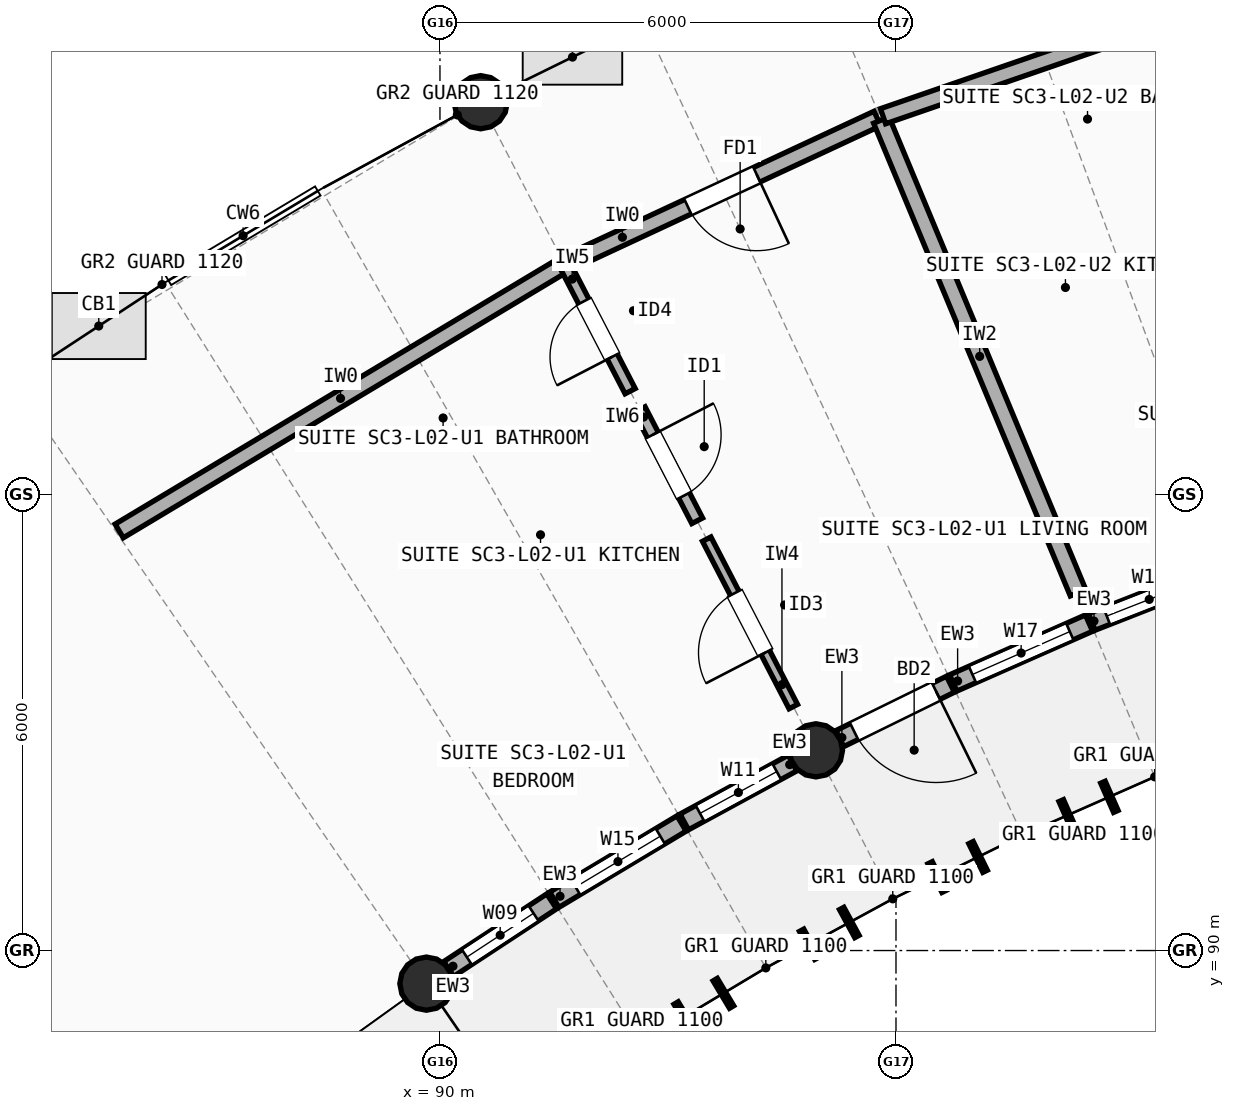
"""IFC4 building model, lengths in metres.
Left out: names, types, materials, properties, quantities, classifications, styles, units other than length and angle.
Written with IfcOpenShell. Run it as: python <this file> out.ifc"""

import sys

from ifc_helpers import new_model, si_unit, direction, frame, frame_2d, origin, origin_2d, place, context, subcontext, project, spatial, rectangle, circle, extrude, element, fill, save


model = new_model("IFC4")
c1 = context("Model", 3, precision=1e-05, world=origin(), true_north=direction((0.0, 1.0)))
c2 = subcontext(c1, "Body", "Model", "MODEL_VIEW")
j1 = project(units=[si_unit("LENGTHUNIT", "METRE"), si_unit("PLANEANGLEUNIT", "RADIAN")], contexts=[c1])
p1 = place(None, origin())
s1 = spatial("IfcSite", under=j1, at=p1, CompositionType="ELEMENT")
p2 = place(p1, origin())
s2 = spatial("IfcBuilding", under=s1, at=p2, CompositionType="ELEMENT")
p3 = place(p2, frame((0.0, 0.0, 7.7)))
s3 = spatial("IfcBuildingStorey", under=s2, at=p3, CompositionType="ELEMENT", Elevation=7.7)
for number, where, z_axis, x_axis in (
    (1, (89.822, 89.564, 0.0), (0.0, 0.0, 1.0), (1.0, 0.0, 0.0)),
    (2, (94.947, 92.634, 0.0), (0.0, 0.0, 1.0), (1.0, 0.0, 0.0)),
    (3, (90.536, 101.161, 0.0), (0.0, 0.0, 1.0), (1.0, 0.0, 0.0)),
):
    element("IfcColumn", number, at=place(p3, frame(where, z_axis=z_axis, x_axis=x_axis)), inside=s3, PredefinedType="COLUMN", context=c2, shape_type="SweptSolid", body=[
        extrude(circle(Radius=0.35, at=origin_2d()), origin(), (0.0, 0.0, 1.0), 2.948),
    ])
p4 = place(p3, frame((90.114, 89.757, 0.0), z_axis=(0.0, 0.0, 1.0), x_axis=(0.835873156341, 0.548922641644, 0.0)))
e4 = element("IfcWall", 4, at=p4, inside=s3, PredefinedType="STANDARD", context=c2, shape_type="SweptSolid", body=[
    extrude(rectangle(XDim=1.623, YDim=0.235, at=frame_2d((0.811, 0.0))), origin(), (0.0, 0.0, 1.0), 2.684),
])
p5 = place(p4, frame((0.286, 0.0, 0.85)))
e5 = element("IfcOpeningElement", 5, at=p5, cuts=e4, PredefinedType="OPENING", context=c2, shape_type="SweptSolid", body=[
    extrude(rectangle(XDim=1.05, YDim=1.35, at=frame_2d((0.525, 0.675))), frame((0.0, 0.127, 0.0), z_axis=(0.0, -1.0, 0.0), x_axis=(1.0, 0.0, 0.0)), (0.0, 0.0, 1.0), 0.255),
])
p6 = place(p3, frame((91.504, 90.668, 0.0), z_axis=(0.0, 0.0, 1.0), x_axis=(0.85787888411, 0.51385194385, 0.0)))
e6 = element("IfcWall", 6, at=p6, inside=s3, PredefinedType="STANDARD", context=c2, shape_type="SweptSolid", body=[
    extrude(rectangle(XDim=1.952, YDim=0.235, at=frame_2d((0.976, 0.0))), origin(), (0.0, 0.0, 1.0), 2.684),
])
p7 = place(p6, frame((0.326, 0.0, 0.85)))
e7 = element("IfcOpeningElement", 7, at=p7, cuts=e6, PredefinedType="OPENING", context=c2, shape_type="SweptSolid", body=[
    extrude(rectangle(XDim=1.3, YDim=1.45, at=frame_2d((0.65, 0.725))), frame((0.0, 0.127, 0.0), z_axis=(0.0, -1.0, 0.0), x_axis=(1.0, 0.0, 0.0)), (0.0, 0.0, 1.0), 0.255),
])
p8 = place(p3, frame((93.214, 91.692, 0.0), z_axis=(0.0, 0.0, 1.0), x_axis=(0.878452871629, 0.477828999044, 0.0)))
e8 = element("IfcWall", 8, at=p8, inside=s3, PredefinedType="STANDARD", context=c2, shape_type="SweptSolid", body=[
    extrude(rectangle(XDim=1.622, YDim=0.235, at=frame_2d((0.811, 0.0))), origin(), (0.0, 0.0, 1.0), 2.684),
])
p9 = place(p8, frame((0.236, 0.0, 0.85)))
e9 = element("IfcOpeningElement", 9, at=p9, cuts=e8, PredefinedType="OPENING", context=c2, shape_type="SweptSolid", body=[
    extrude(rectangle(XDim=1.15, YDim=1.45, at=frame_2d((0.575, 0.725))), frame((0.0, 0.127, 0.0), z_axis=(0.0, -1.0, 0.0), x_axis=(1.0, 0.0, 0.0)), (0.0, 0.0, 1.0), 0.255),
])
p10 = place(p3, frame((95.261, 92.788, 0.0), z_axis=(0.0, 0.0, 1.0), x_axis=(0.897535518759, 0.440942164649, 0.0)))
e10 = element("IfcWall", 10, at=p10, inside=s3, PredefinedType="STANDARD", context=c2, shape_type="SweptSolid", body=[
    extrude(rectangle(XDim=1.622, YDim=0.235, at=frame_2d((0.811, 0.0))), origin(), (0.0, 0.0, 1.0), 2.684),
])
p11 = place(p10, frame((0.211, 0.0, 0.0)))
e11 = element("IfcOpeningElement", 11, at=p11, cuts=e10, PredefinedType="OPENING", context=c2, shape_type="SweptSolid", body=[
    extrude(rectangle(XDim=1.2, YDim=2.15, at=frame_2d((0.6, 1.075))), frame((0.0, 0.127, 0.0), z_axis=(0.0, -1.0, 0.0), x_axis=(1.0, 0.0, 0.0)), (0.0, 0.0, 1.0), 0.255),
])
p12 = place(p3, frame((96.753, 93.521, 0.0), z_axis=(0.0, 0.0, 1.0), x_axis=(0.915126852478, 0.403166025197, 0.0)))
e12 = element("IfcWall", 12, at=p12, inside=s3, PredefinedType="STANDARD", context=c2, shape_type="SweptSolid", body=[
    extrude(rectangle(XDim=1.952, YDim=0.235, at=frame_2d((0.976, 0.0))), origin(), (0.0, 0.0, 1.0), 2.684),
])
p13 = place(p12, frame((0.276, 0.0, 0.85)))
e13 = element("IfcOpeningElement", 13, at=p13, cuts=e12, PredefinedType="OPENING", context=c2, shape_type="SweptSolid", body=[
    extrude(rectangle(XDim=1.4, YDim=1.5, at=frame_2d((0.7, 0.75))), frame((0.0, 0.127, 0.0), z_axis=(0.0, -1.0, 0.0), x_axis=(1.0, 0.0, 0.0)), (0.0, 0.0, 1.0), 0.255),
])
p14 = place(p3, frame((98.577, 94.323, 0.0), z_axis=(0.0, 0.0, 1.0), x_axis=(0.930967180533, 0.365102874228, 0.0)))
e14 = element("IfcWall", 14, at=p14, inside=s3, PredefinedType="STANDARD", context=c2, shape_type="SweptSolid", body=[
    extrude(rectangle(XDim=1.622, YDim=0.235, at=frame_2d((0.811, 0.0))), origin(), (0.0, 0.0, 1.0), 2.684),
])
p15 = place(p14, frame((0.211, 0.0, 0.85)))
e15 = element("IfcOpeningElement", 15, at=p15, cuts=e14, PredefinedType="OPENING", context=c2, shape_type="SweptSolid", body=[
    extrude(rectangle(XDim=1.2, YDim=1.45, at=frame_2d((0.6, 0.725))), frame((0.0, 0.127, 0.0), z_axis=(0.0, -1.0, 0.0), x_axis=(1.0, 0.0, 0.0)), (0.0, 0.0, 1.0), 0.255),
])
p16 = place(p3, frame((85.779, 95.52, 0.0), z_axis=(0.0, 0.0, 1.0), x_axis=(0.857911441451, 0.513797585268, 0.0)))
e16 = element("IfcWall", 16, at=p16, inside=s3, PredefinedType="SOLIDWALL", context=c2, shape_type="SweptSolid", body=[
    extrude(rectangle(XDim=6.79, YDim=0.21, at=frame_2d((3.395, 0.0))), origin(), (0.0, 0.0, 1.0), 2.722),
])
p17 = place(p3, frame((91.675, 99.046, 0.0), z_axis=(0.0, 0.0, 1.0), x_axis=(0.906512639591, 0.422178675755, 0.0)))
e17 = element("IfcWall", 17, at=p17, inside=s3, PredefinedType="SOLIDWALL", context=c2, shape_type="SweptSolid", body=[
    extrude(rectangle(XDim=4.501, YDim=0.21, at=frame_2d((2.251, 0.0))), origin(), (0.0, 0.0, 1.0), 2.762),
])
p18 = place(p17, frame((1.751, 0.0, 0.0)))
e18 = element("IfcOpeningElement", 18, at=p18, cuts=e17, PredefinedType="OPENING", context=c2, shape_type="SweptSolid", body=[
    extrude(rectangle(XDim=1.0, YDim=2.15, at=frame_2d((0.5, 1.075))), frame((0.0, 0.115, 0.0), z_axis=(0.0, -1.0, 0.0), x_axis=(1.0, 0.0, 0.0)), (0.0, 0.0, 1.0), 0.23),
])
p19 = place(p3, frame((94.649, 93.209, 0.0), z_axis=(0.0, 0.0, 1.0), x_axis=(-0.459457735566, 0.888199633657, 0.0)))
e19 = element("IfcWall", 19, at=p19, inside=s3, PredefinedType="PARTITIONING", context=c2, shape_type="SweptSolid", body=[
    extrude(rectangle(XDim=2.48, YDim=0.125, at=frame_2d((1.24, 0.0))), origin(), (0.0, 0.0, 1.0), 2.742),
])
p20 = place(p19, frame((0.8, 0.0, 0.0)))
e20 = element("IfcOpeningElement", 20, at=p20, cuts=e19, PredefinedType="OPENING", context=c2, shape_type="SweptSolid", body=[
    extrude(rectangle(XDim=0.88, YDim=2.1, at=frame_2d((0.44, 1.05))), frame((0.0, 0.073, 0.0), z_axis=(0.0, -1.0, 0.0), x_axis=(1.0, 0.0, 0.0)), (0.0, 0.0, 1.0), 0.145),
])
p21 = place(p3, frame((93.385, 95.654, 0.0), z_axis=(0.0, 0.0, 1.0), x_axis=(-0.459495453195, 0.888180121649, 0.0)))
e21 = element("IfcWall", 21, at=p21, inside=s3, PredefinedType="PLUMBINGWALL", context=c2, shape_type="SweptSolid", body=[
    extrude(rectangle(XDim=1.648, YDim=0.16, at=frame_2d((0.824, 0.0))), origin(), (0.0, 0.0, 1.0), 2.742),
])
p22 = place(p21, frame((0.374, 0.0, 0.0)))
e22 = element("IfcOpeningElement", 22, at=p22, cuts=e21, PredefinedType="OPENING", context=c2, shape_type="SweptSolid", body=[
    extrude(rectangle(XDim=0.9, YDim=2.1, at=frame_2d((0.45, 1.05))), frame((0.0, 0.09, 0.0), z_axis=(0.0, -1.0, 0.0), x_axis=(1.0, 0.0, 0.0)), (0.0, 0.0, 1.0), 0.18),
])
p23 = place(p3, frame((92.502, 97.359, 0.0), z_axis=(0.0, 0.0, 1.0), x_axis=(-0.459379600499, 0.888240047873, 0.0)))
e23 = element("IfcWall", 23, at=p23, inside=s3, PredefinedType="PARTITIONING", context=c2, shape_type="SweptSolid", body=[
    extrude(rectangle(XDim=1.84, YDim=0.15, at=frame_2d((0.92, 0.0))), origin(), (0.0, 0.0, 1.0), 2.742),
])
p24 = place(p23, frame((0.51, 0.0, 0.0)))
e24 = element("IfcOpeningElement", 24, at=p24, cuts=e23, PredefinedType="OPENING", context=c2, shape_type="SweptSolid", body=[
    extrude(rectangle(XDim=0.82, YDim=2.08, at=frame_2d((0.41, 1.04))), frame((0.0, 0.085, 0.0), z_axis=(0.0, -1.0, 0.0), x_axis=(1.0, 0.0, 0.0)), (0.0, 0.0, 1.0), 0.17),
])
p25 = place(p3, frame((98.395, 94.707, 0.0), z_axis=(0.0, 0.0, 1.0), x_axis=(-0.384190705314, 0.923253758157, 0.0)))
e25 = element("IfcWall", 25, at=p25, inside=s3, PredefinedType="SOLIDWALL", context=c2, shape_type="SweptSolid", body=[
    extrude(rectangle(XDim=6.736, YDim=0.22, at=frame_2d((3.368, 0.0))), origin(), (0.0, 0.0, 1.0), 2.722),
])
p26 = place(p3, frame((95.83, 100.976, 0.0), z_axis=(0.0, 0.0, 1.0), x_axis=(0.945371453115, 0.325995115969, 0.0)))
e26 = element("IfcWall", 26, at=p26, inside=s3, PredefinedType="SOLIDWALL", context=c2, shape_type="SweptSolid", body=[
    extrude(rectangle(XDim=6.79, YDim=0.21, at=frame_2d((3.395, 0.0))), origin(), (0.0, 0.0, 1.0), 2.742),
])
p27 = place(p5, origin())
e27 = element("IfcWindow", 27, at=p27, inside=s3, PartitioningType="SINGLE_PANEL", PredefinedType="WINDOW", context=c2, shape_type="SweptSolid", body=[
    extrude(rectangle(XDim=1.05, YDim=1.35, at=frame_2d((0.525, 0.675))), frame((0.0, 0.03, 0.0), z_axis=(0.0, -1.0, 0.0), x_axis=(1.0, 0.0, 0.0)), (0.0, 0.0, 1.0), 0.06),
])
fill(e5, e27)
p28 = place(p7, origin())
e28 = element("IfcWindow", 28, at=p28, inside=s3, PartitioningType="SINGLE_PANEL", PredefinedType="WINDOW", context=c2, shape_type="SweptSolid", body=[
    extrude(rectangle(XDim=1.3, YDim=1.45, at=frame_2d((0.65, 0.725))), frame((0.0, 0.03, 0.0), z_axis=(0.0, -1.0, 0.0), x_axis=(1.0, 0.0, 0.0)), (0.0, 0.0, 1.0), 0.06),
])
fill(e7, e28)
p29 = place(p9, origin())
e29 = element("IfcWindow", 29, at=p29, inside=s3, PartitioningType="SINGLE_PANEL", PredefinedType="WINDOW", context=c2, shape_type="SweptSolid", body=[
    extrude(rectangle(XDim=1.15, YDim=1.45, at=frame_2d((0.575, 0.725))), frame((0.0, 0.03, 0.0), z_axis=(0.0, -1.0, 0.0), x_axis=(1.0, 0.0, 0.0)), (0.0, 0.0, 1.0), 0.06),
])
fill(e9, e29)
p30 = place(p11, frame((1.2, 0.0, 0.0), z_axis=(0.0, 0.0, 1.0), x_axis=(-1.0, 0.0, 0.0)))
e30 = element("IfcDoor", 30, at=p30, inside=s3, OperationType="SINGLE_SWING_RIGHT", PredefinedType="DOOR", context=c2, shape_type="SweptSolid", body=[
    extrude(rectangle(XDim=1.2, YDim=2.15, at=frame_2d((0.6, 1.075))), frame((0.0, 0.025, 0.0), z_axis=(0.0, -1.0, 0.0), x_axis=(1.0, 0.0, 0.0)), (0.0, 0.0, 1.0), 0.05),
])
fill(e11, e30)
p31 = place(p13, origin())
e31 = element("IfcWindow", 31, at=p31, inside=s3, PartitioningType="SINGLE_PANEL", PredefinedType="WINDOW", context=c2, shape_type="SweptSolid", body=[
    extrude(rectangle(XDim=1.4, YDim=1.5, at=frame_2d((0.7, 0.75))), frame((0.0, 0.03, 0.0), z_axis=(0.0, -1.0, 0.0), x_axis=(1.0, 0.0, 0.0)), (0.0, 0.0, 1.0), 0.06),
])
fill(e13, e31)
p32 = place(p15, origin())
e32 = element("IfcWindow", 32, at=p32, inside=s3, PartitioningType="SINGLE_PANEL", PredefinedType="WINDOW", context=c2, shape_type="SweptSolid", body=[
    extrude(rectangle(XDim=1.2, YDim=1.45, at=frame_2d((0.6, 0.725))), frame((0.0, 0.03, 0.0), z_axis=(0.0, -1.0, 0.0), x_axis=(1.0, 0.0, 0.0)), (0.0, 0.0, 1.0), 0.06),
])
fill(e15, e32)
p33 = place(p18, origin())
e33 = element("IfcDoor", 33, at=p33, inside=s3, OperationType="SINGLE_SWING_RIGHT", PredefinedType="DOOR", context=c2, shape_type="SweptSolid", body=[
    extrude(rectangle(XDim=1.0, YDim=2.15, at=frame_2d((0.5, 1.075))), frame((0.0, 0.025, 0.0), z_axis=(0.0, -1.0, 0.0), x_axis=(1.0, 0.0, 0.0)), (0.0, 0.0, 1.0), 0.05),
])
fill(e18, e33)
p34 = place(p20, origin())
e34 = element("IfcDoor", 34, at=p34, inside=s3, OperationType="SINGLE_SWING_LEFT", PredefinedType="DOOR", context=c2, shape_type="SweptSolid", body=[
    extrude(rectangle(XDim=0.88, YDim=2.1, at=frame_2d((0.44, 1.05))), frame((0.0, 0.025, 0.0), z_axis=(0.0, -1.0, 0.0), x_axis=(1.0, 0.0, 0.0)), (0.0, 0.0, 1.0), 0.05),
])
fill(e20, e34)
p35 = place(p22, origin())
e35 = element("IfcDoor", 35, at=p35, inside=s3, OperationType="SINGLE_SWING_RIGHT", PredefinedType="DOOR", context=c2, shape_type="SweptSolid", body=[
    extrude(rectangle(XDim=0.9, YDim=2.1, at=frame_2d((0.45, 1.05))), frame((0.0, 0.025, 0.0), z_axis=(0.0, -1.0, 0.0), x_axis=(1.0, 0.0, 0.0)), (0.0, 0.0, 1.0), 0.05),
])
fill(e22, e35)
p36 = place(p24, origin())
e36 = element("IfcDoor", 36, at=p36, inside=s3, OperationType="SINGLE_SWING_LEFT", PredefinedType="DOOR", context=c2, shape_type="SweptSolid", body=[
    extrude(rectangle(XDim=0.82, YDim=2.08, at=frame_2d((0.41, 1.04))), frame((0.0, 0.025, 0.0), z_axis=(0.0, -1.0, 0.0), x_axis=(1.0, 0.0, 0.0)), (0.0, 0.0, 1.0), 0.05),
])
fill(e24, e36)
save(model, sys.argv[1])
